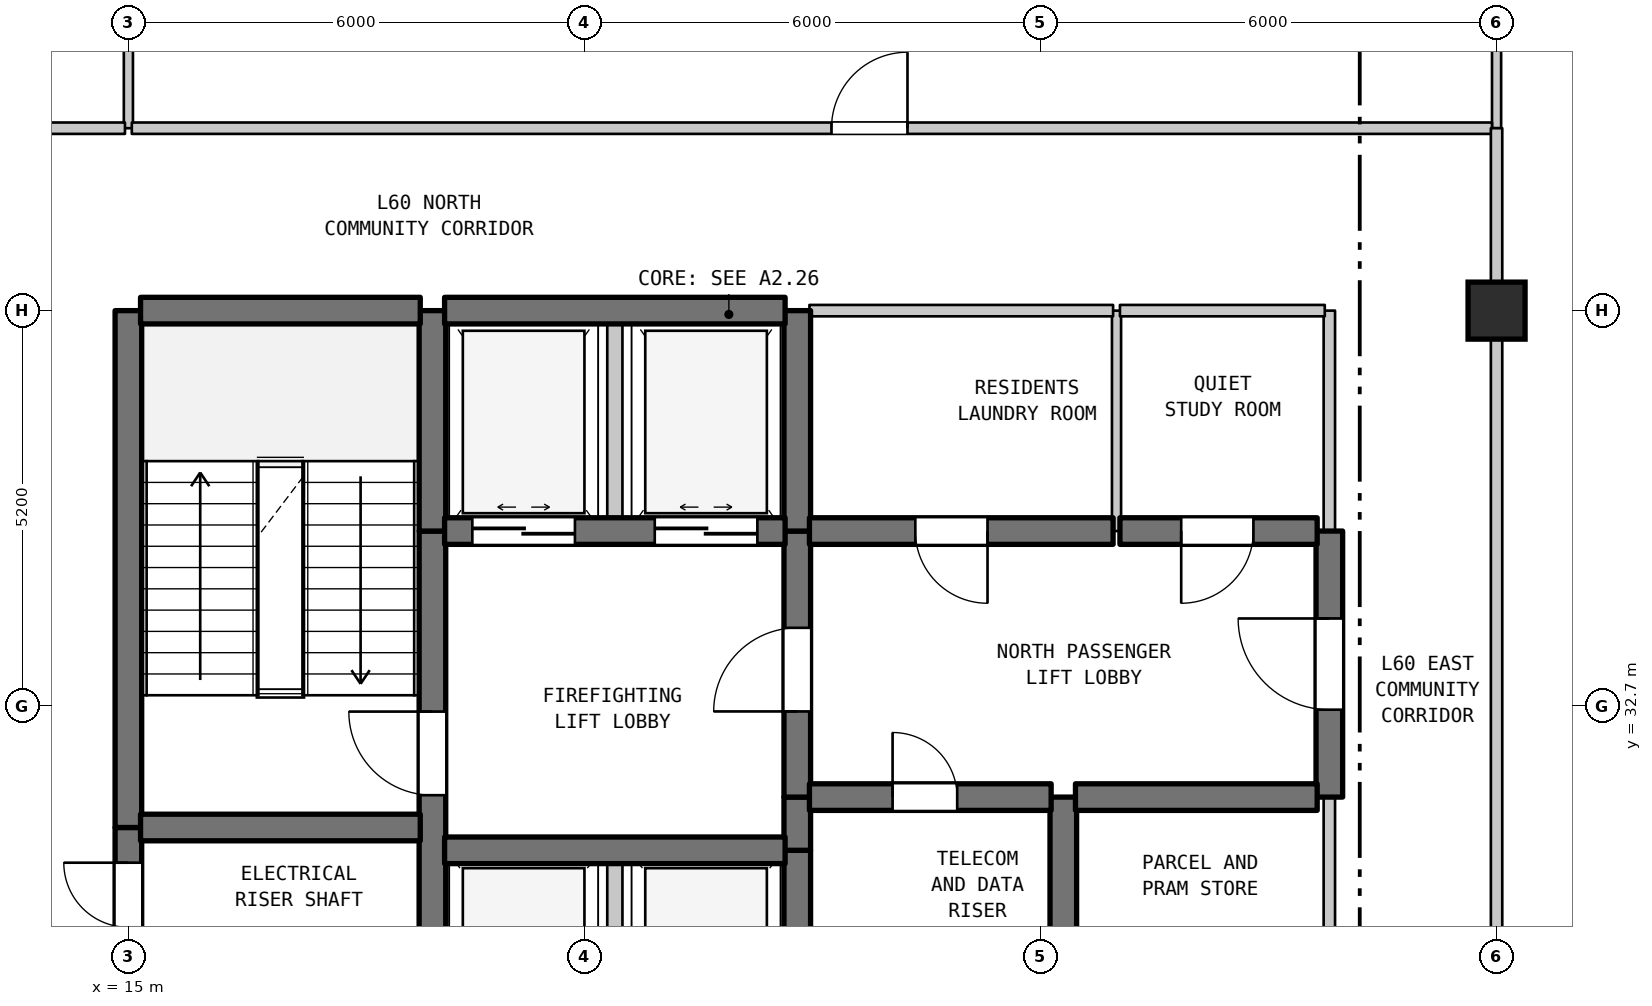
"""IFC4 building model, lengths in metres.
Left out: names, types, materials, properties, quantities, classifications, styles, units other than length and angle.
Written with IfcOpenShell. Run it as: python <this file> out.ifc"""

import sys

from ifc_helpers import new_model, si_unit, direction, frame, frame_2d, origin, origin_2d, place, context, subcontext, project, spatial, rectangle, extrude, element, fill, save


model = new_model("IFC4")
c1 = context("Model", 3, precision=1e-05, world=origin(), true_north=direction((0.0, 1.0)))
c2 = subcontext(c1, "Body", "Model", "MODEL_VIEW")
j1 = project(units=[si_unit("LENGTHUNIT", "METRE"), si_unit("PLANEANGLEUNIT", "RADIAN")], contexts=[c1])
p1 = place(None, origin())
s1 = spatial("IfcSite", under=j1, at=p1, CompositionType="ELEMENT")
p2 = place(p1, origin())
s2 = spatial("IfcBuilding", under=s1, at=p2, CompositionType="ELEMENT")
p3 = place(p2, frame((0.0, 0.0, 242.8)))
s3 = spatial("IfcBuildingStorey", under=s2, at=p3, CompositionType="ELEMENT", Elevation=242.8)
p4 = place(p3, frame((33.0, 37.9, 0.0), z_axis=(0.0, 0.0, 1.0), x_axis=(1.0, 0.0, 0.0)))
e1 = element("IfcColumn", 1, at=p4, inside=s3, PredefinedType="COLUMN", context=c2, shape_type="SweptSolid", body=[
    extrude(rectangle(XDim=0.75, YDim=0.75, at=origin_2d()), origin(), (0.0, 0.0, 1.0), 4.5),
])
p5 = place(p3, frame((15.0, 29.5, 0.0), z_axis=(0.0, 0.0, 1.0), x_axis=(0.0, 1.0, 0.0)))
e2 = element("IfcWall", 2, at=p5, inside=s3, PredefinedType="SHEAR", context=c2, shape_type="SweptSolid", body=[
    extrude(rectangle(XDim=1.6, YDim=0.35, at=frame_2d((0.8, 0.0))), origin(), (0.0, 0.0, 1.0), 4.19),
])
p6 = place(p5, frame((0.287, 0.0, 0.0)))
e3 = element("IfcOpeningElement", 3, at=p6, cuts=e2, PredefinedType="OPENING", context=c2, shape_type="SweptSolid", body=[
    extrude(rectangle(XDim=0.85, YDim=2.1, at=frame_2d((0.425, 1.05))), frame((0.0, 0.185, 0.0), z_axis=(0.0, -1.0, 0.0), x_axis=(1.0, 0.0, 0.0)), (0.0, 0.0, 1.0), 0.37),
])
p7 = place(p3, frame((15.0, 31.1, 0.0), z_axis=(0.0, 0.0, 1.0), x_axis=(0.0, 1.0, 0.0)))
e4 = element("IfcWall", 4, at=p7, inside=s3, PredefinedType="SHEAR", context=c2, shape_type="SweptSolid", body=[
    extrude(rectangle(XDim=6.8, YDim=0.35, at=frame_2d((3.4, 0.0))), origin(), (0.0, 0.0, 1.0), 4.19),
])
p8 = place(p3, frame((15.0, 40.3, 0.0), z_axis=(0.0, 0.0, 1.0), x_axis=(0.0, 1.0, 0.0)))
e5 = element("IfcWall", 5, at=p8, inside=s3, PredefinedType="PARTITIONING", context=c2, shape_type="SweptSolid", body=[
    extrude(rectangle(XDim=12.933, YDim=0.12, at=frame_2d((6.466, 0.0))), origin(), (0.0, 0.0, 1.0), 4.19),
])
p9 = place(p3, frame((19.0, 29.5, 0.0), z_axis=(0.0, 0.0, 1.0), x_axis=(0.0, 1.0, 0.0)))
e6 = element("IfcWall", 6, at=p9, inside=s3, PredefinedType="SHEAR", context=c2, shape_type="SweptSolid", body=[
    extrude(rectangle(XDim=5.5, YDim=0.35, at=frame_2d((2.75, 0.0))), origin(), (0.0, 0.0, 1.0), 4.19),
])
p10 = place(p9, frame((2.025, 0.0, 0.0)))
e7 = element("IfcOpeningElement", 7, at=p10, cuts=e6, PredefinedType="OPENING", context=c2, shape_type="SweptSolid", body=[
    extrude(rectangle(XDim=1.1, YDim=2.15, at=frame_2d((0.55, 1.075))), frame((0.0, 0.185, 0.0), z_axis=(0.0, -1.0, 0.0), x_axis=(1.0, 0.0, 0.0)), (0.0, 0.0, 1.0), 0.37),
])
p11 = place(p3, frame((19.0, 35.0, 0.0), z_axis=(0.0, 0.0, 1.0), x_axis=(0.0, 1.0, 0.0)))
e8 = element("IfcWall", 8, at=p11, inside=s3, PredefinedType="SHEAR", context=c2, shape_type="SweptSolid", body=[
    extrude(rectangle(XDim=2.9, YDim=0.35, at=frame_2d((1.45, 0.0))), origin(), (0.0, 0.0, 1.0), 4.19),
])
p12 = place(p3, frame((21.4, 28.2, 0.0), z_axis=(0.0, 0.0, 1.0), x_axis=(0.0, 1.0, 0.0)))
e9 = element("IfcWall", 9, at=p12, inside=s3, PredefinedType="STANDARD", context=c2, shape_type="SweptSolid", body=[
    extrude(rectangle(XDim=2.6, YDim=0.2, at=frame_2d((1.3, 0.0))), origin(), (0.0, 0.0, 1.0), 4.19),
])
p13 = place(p3, frame((21.4, 35.0, 0.0), z_axis=(0.0, 0.0, 1.0), x_axis=(0.0, 1.0, 0.0)))
e10 = element("IfcWall", 10, at=p13, inside=s3, PredefinedType="STANDARD", context=c2, shape_type="SweptSolid", body=[
    extrude(rectangle(XDim=2.9, YDim=0.2, at=frame_2d((1.45, 0.0))), origin(), (0.0, 0.0, 1.0), 4.19),
])
p14 = place(p3, frame((23.8, 28.2, 0.0), z_axis=(0.0, 0.0, 1.0), x_axis=(0.0, 1.0, 0.0)))
e11 = element("IfcWall", 11, at=p14, inside=s3, PredefinedType="SHEAR", context=c2, shape_type="SweptSolid", body=[
    extrude(rectangle(XDim=2.6, YDim=0.35, at=frame_2d((1.3, 0.0))), origin(), (0.0, 0.0, 1.0), 4.19),
])
p15 = place(p3, frame((23.8, 30.8, 0.0), z_axis=(0.0, 0.0, 1.0), x_axis=(0.0, 1.0, 0.0)))
e12 = element("IfcWall", 12, at=p15, inside=s3, PredefinedType="SHEAR", context=c2, shape_type="SweptSolid", body=[
    extrude(rectangle(XDim=0.7, YDim=0.35, at=frame_2d((0.35, 0.0))), origin(), (0.0, 0.0, 1.0), 4.19),
])
p16 = place(p3, frame((23.8, 31.5, 0.0), z_axis=(0.0, 0.0, 1.0), x_axis=(0.0, 1.0, 0.0)))
e13 = element("IfcWall", 13, at=p16, inside=s3, PredefinedType="SHEAR", context=c2, shape_type="SweptSolid", body=[
    extrude(rectangle(XDim=3.5, YDim=0.35, at=frame_2d((1.75, 0.0))), origin(), (0.0, 0.0, 1.0), 4.19),
])
p17 = place(p16, frame((1.127, 0.0, 0.0)))
e14 = element("IfcOpeningElement", 14, at=p17, cuts=e13, PredefinedType="OPENING", context=c2, shape_type="SweptSolid", body=[
    extrude(rectangle(XDim=1.1, YDim=2.15, at=frame_2d((0.55, 1.075))), frame((0.0, 0.185, 0.0), z_axis=(0.0, -1.0, 0.0), x_axis=(1.0, 0.0, 0.0)), (0.0, 0.0, 1.0), 0.37),
])
p18 = place(p3, frame((23.8, 35.0, 0.0), z_axis=(0.0, 0.0, 1.0), x_axis=(0.0, 1.0, 0.0)))
e15 = element("IfcWall", 15, at=p18, inside=s3, PredefinedType="SHEAR", context=c2, shape_type="SweptSolid", body=[
    extrude(rectangle(XDim=2.9, YDim=0.35, at=frame_2d((1.45, 0.0))), origin(), (0.0, 0.0, 1.0), 4.19),
])
p19 = place(p3, frame((27.3, 28.9, 0.0), z_axis=(0.0, 0.0, 1.0), x_axis=(0.0, 1.0, 0.0)))
e16 = element("IfcWall", 16, at=p19, inside=s3, PredefinedType="SHEAR", context=c2, shape_type="SweptSolid", body=[
    extrude(rectangle(XDim=2.6, YDim=0.35, at=frame_2d((1.3, 0.0))), origin(), (0.0, 0.0, 1.0), 4.19),
])
p20 = place(p3, frame((28.0, 35.0, 0.0), z_axis=(0.0, 0.0, 1.0), x_axis=(0.0, 1.0, 0.0)))
e17 = element("IfcWall", 17, at=p20, inside=s3, PredefinedType="PARTITIONING", context=c2, shape_type="SweptSolid", body=[
    extrude(rectangle(XDim=2.9, YDim=0.12, at=frame_2d((1.45, 0.0))), origin(), (0.0, 0.0, 1.0), 4.19),
])
p21 = place(p3, frame((30.8, 28.9, 0.0), z_axis=(0.0, 0.0, 1.0), x_axis=(0.0, 1.0, 0.0)))
e18 = element("IfcWall", 18, at=p21, inside=s3, PredefinedType="STANDARD", context=c2, shape_type="SweptSolid", body=[
    extrude(rectangle(XDim=2.6, YDim=0.15, at=frame_2d((1.3, 0.0))), origin(), (0.0, 0.0, 1.0), 4.19),
])
p22 = place(p3, frame((30.8, 31.5, 0.0), z_axis=(0.0, 0.0, 1.0), x_axis=(0.0, 1.0, 0.0)))
e19 = element("IfcWall", 19, at=p22, inside=s3, PredefinedType="SHEAR", context=c2, shape_type="SweptSolid", body=[
    extrude(rectangle(XDim=3.5, YDim=0.35, at=frame_2d((1.75, 0.0))), origin(), (0.0, 0.0, 1.0), 4.19),
])
p23 = place(p22, frame((1.15, 0.0, 0.0)))
e20 = element("IfcOpeningElement", 20, at=p23, cuts=e19, PredefinedType="OPENING", context=c2, shape_type="SweptSolid", body=[
    extrude(rectangle(XDim=1.2, YDim=2.2, at=frame_2d((0.6, 1.1))), frame((0.0, 0.185, 0.0), z_axis=(0.0, -1.0, 0.0), x_axis=(1.0, 0.0, 0.0)), (0.0, 0.0, 1.0), 0.37),
])
p24 = place(p3, frame((30.8, 35.0, 0.0), z_axis=(0.0, 0.0, 1.0), x_axis=(0.0, 1.0, 0.0)))
e21 = element("IfcWall", 21, at=p24, inside=s3, PredefinedType="STANDARD", context=c2, shape_type="SweptSolid", body=[
    extrude(rectangle(XDim=2.9, YDim=0.15, at=frame_2d((1.45, 0.0))), origin(), (0.0, 0.0, 1.0), 4.19),
])
p25 = place(p3, frame((33.0, 27.9, 0.0), z_axis=(0.0, 0.0, 1.0), x_axis=(0.0, 1.0, 0.0)))
e22 = element("IfcWall", 22, at=p25, inside=s3, PredefinedType="STANDARD", context=c2, shape_type="SweptSolid", body=[
    extrude(rectangle(XDim=10.0, YDim=0.15, at=frame_2d((5.0, 0.0))), origin(), (0.0, 0.0, 1.0), 3.69),
])
p26 = place(p3, frame((33.0, 40.3, 0.0), z_axis=(0.0, 0.0, 1.0), x_axis=(0.0, 1.0, 0.0)))
e23 = element("IfcWall", 23, at=p26, inside=s3, PredefinedType="PARTITIONING", context=c2, shape_type="SweptSolid", body=[
    extrude(rectangle(XDim=13.59, YDim=0.12, at=frame_2d((6.795, 0.0))), origin(), (0.0, 0.0, 1.0), 3.59),
])
p27 = place(p3, frame((19.16, 30.8, 0.0), z_axis=(0.0, 0.0, 1.0), x_axis=(1.0, 0.0, 0.0)))
e24 = element("IfcWall", 24, at=p27, inside=s3, PredefinedType="SHEAR", context=c2, shape_type="SweptSolid", body=[
    extrude(rectangle(XDim=4.48, YDim=0.35, at=frame_2d((2.24, 0.0))), origin(), (0.0, 0.0, 1.0), 4.19),
])
p28 = place(p3, frame((15.16, 31.1, 0.0), z_axis=(0.0, 0.0, 1.0), x_axis=(1.0, 0.0, 0.0)))
e25 = element("IfcWall", 25, at=p28, inside=s3, PredefinedType="SHEAR", context=c2, shape_type="SweptSolid", body=[
    extrude(rectangle(XDim=3.68, YDim=0.35, at=frame_2d((1.84, 0.0))), origin(), (0.0, 0.0, 1.0), 4.19),
])
p29 = place(p3, frame((23.96, 31.5, 0.0), z_axis=(0.0, 0.0, 1.0), x_axis=(1.0, 0.0, 0.0)))
e26 = element("IfcWall", 26, at=p29, inside=s3, PredefinedType="SHEAR", context=c2, shape_type="SweptSolid", body=[
    extrude(rectangle(XDim=3.18, YDim=0.35, at=frame_2d((1.59, 0.0))), origin(), (0.0, 0.0, 1.0), 4.19),
])
p30 = place(p29, frame((1.094, 0.0, 0.0)))
e27 = element("IfcOpeningElement", 27, at=p30, cuts=e26, PredefinedType="OPENING", context=c2, shape_type="SweptSolid", body=[
    extrude(rectangle(XDim=0.85, YDim=2.1, at=frame_2d((0.425, 1.05))), frame((0.0, 0.185, 0.0), z_axis=(0.0, -1.0, 0.0), x_axis=(1.0, 0.0, 0.0)), (0.0, 0.0, 1.0), 0.37),
])
p31 = place(p3, frame((27.46, 31.5, 0.0), z_axis=(0.0, 0.0, 1.0), x_axis=(1.0, 0.0, 0.0)))
e28 = element("IfcWall", 28, at=p31, inside=s3, PredefinedType="SHEAR", context=c2, shape_type="SweptSolid", body=[
    extrude(rectangle(XDim=3.18, YDim=0.35, at=frame_2d((1.59, 0.0))), origin(), (0.0, 0.0, 1.0), 4.19),
])
p32 = place(p3, frame((19.16, 35.0, 0.0), z_axis=(0.0, 0.0, 1.0), x_axis=(1.0, 0.0, 0.0)))
e29 = element("IfcWall", 29, at=p32, inside=s3, PredefinedType="SHEAR", context=c2, shape_type="SweptSolid", body=[
    extrude(rectangle(XDim=4.48, YDim=0.35, at=frame_2d((2.24, 0.0))), origin(), (0.0, 0.0, 1.0), 4.19),
])
p33 = place(p32, frame((0.365, 0.0, 0.0)))
e30 = element("IfcOpeningElement", 30, at=p33, cuts=e29, PredefinedType="OPENING", context=c2, shape_type="SweptSolid", body=[
    extrude(rectangle(XDim=1.35, YDim=2.2, at=frame_2d((0.675, 1.1))), frame((0.0, 0.185, 0.0), z_axis=(0.0, -1.0, 0.0), x_axis=(1.0, 0.0, 0.0)), (0.0, 0.0, 1.0), 0.37),
])
p34 = place(p32, frame((2.765, 0.0, 0.0)))
e31 = element("IfcOpeningElement", 31, at=p34, cuts=e29, PredefinedType="OPENING", context=c2, shape_type="SweptSolid", body=[
    extrude(rectangle(XDim=1.35, YDim=2.2, at=frame_2d((0.675, 1.1))), frame((0.0, 0.185, 0.0), z_axis=(0.0, -1.0, 0.0), x_axis=(1.0, 0.0, 0.0)), (0.0, 0.0, 1.0), 0.37),
])
p35 = place(p3, frame((23.96, 35.0, 0.0), z_axis=(0.0, 0.0, 1.0), x_axis=(1.0, 0.0, 0.0)))
e32 = element("IfcWall", 32, at=p35, inside=s3, PredefinedType="SHEAR", context=c2, shape_type="SweptSolid", body=[
    extrude(rectangle(XDim=3.995, YDim=0.35, at=frame_2d((1.998, 0.0))), origin(), (0.0, 0.0, 1.0), 4.19),
])
p36 = place(p35, frame((1.393, 0.0, 0.0)))
e33 = element("IfcOpeningElement", 33, at=p36, cuts=e32, PredefinedType="OPENING", context=c2, shape_type="SweptSolid", body=[
    extrude(rectangle(XDim=0.95, YDim=2.15, at=frame_2d((0.475, 1.075))), frame((0.0, 0.185, 0.0), z_axis=(0.0, -1.0, 0.0), x_axis=(1.0, 0.0, 0.0)), (0.0, 0.0, 1.0), 0.37),
])
p37 = place(p3, frame((28.045, 35.0, 0.0), z_axis=(0.0, 0.0, 1.0), x_axis=(1.0, 0.0, 0.0)))
e34 = element("IfcWall", 34, at=p37, inside=s3, PredefinedType="SHEAR", context=c2, shape_type="SweptSolid", body=[
    extrude(rectangle(XDim=2.595, YDim=0.35, at=frame_2d((1.297, 0.0))), origin(), (0.0, 0.0, 1.0), 4.19),
])
p38 = place(p37, frame((0.806, 0.0, 0.0)))
e35 = element("IfcOpeningElement", 35, at=p38, cuts=e34, PredefinedType="OPENING", context=c2, shape_type="SweptSolid", body=[
    extrude(rectangle(XDim=0.95, YDim=2.15, at=frame_2d((0.475, 1.075))), frame((0.0, 0.185, 0.0), z_axis=(0.0, -1.0, 0.0), x_axis=(1.0, 0.0, 0.0)), (0.0, 0.0, 1.0), 0.37),
])
p39 = place(p3, frame((15.16, 37.9, 0.0), z_axis=(0.0, 0.0, 1.0), x_axis=(1.0, 0.0, 0.0)))
e36 = element("IfcWall", 36, at=p39, inside=s3, PredefinedType="SHEAR", context=c2, shape_type="SweptSolid", body=[
    extrude(rectangle(XDim=3.68, YDim=0.35, at=frame_2d((1.84, 0.0))), origin(), (0.0, 0.0, 1.0), 4.19),
])
p40 = place(p3, frame((19.16, 37.9, 0.0), z_axis=(0.0, 0.0, 1.0), x_axis=(1.0, 0.0, 0.0)))
e37 = element("IfcWall", 37, at=p40, inside=s3, PredefinedType="SHEAR", context=c2, shape_type="SweptSolid", body=[
    extrude(rectangle(XDim=4.48, YDim=0.35, at=frame_2d((2.24, 0.0))), origin(), (0.0, 0.0, 1.0), 4.19),
])
p41 = place(p3, frame((23.96, 37.9, 0.0), z_axis=(0.0, 0.0, 1.0), x_axis=(1.0, 0.0, 0.0)))
e38 = element("IfcWall", 38, at=p41, inside=s3, PredefinedType="STANDARD", context=c2, shape_type="SweptSolid", body=[
    extrude(rectangle(XDim=3.995, YDim=0.15, at=frame_2d((1.998, 0.0))), origin(), (0.0, 0.0, 1.0), 3.69),
])
p42 = place(p3, frame((28.045, 37.9, 0.0), z_axis=(0.0, 0.0, 1.0), x_axis=(1.0, 0.0, 0.0)))
e39 = element("IfcWall", 39, at=p42, inside=s3, PredefinedType="STANDARD", context=c2, shape_type="SweptSolid", body=[
    extrude(rectangle(XDim=2.695, YDim=0.15, at=frame_2d((1.348, 0.0))), origin(), (0.0, 0.0, 1.0), 3.69),
])
p43 = place(p3, frame((12.66, 40.3, 0.0), z_axis=(0.0, 0.0, 1.0), x_axis=(1.0, 0.0, 0.0)))
e40 = element("IfcWall", 40, at=p43, inside=s3, PredefinedType="STANDARD", context=c2, shape_type="SweptSolid", body=[
    extrude(rectangle(XDim=2.295, YDim=0.15, at=frame_2d((1.147, 0.0))), origin(), (0.0, 0.0, 1.0), 4.19),
])
p44 = place(p3, frame((15.045, 40.3, 0.0), z_axis=(0.0, 0.0, 1.0), x_axis=(1.0, 0.0, 0.0)))
e41 = element("IfcWall", 41, at=p44, inside=s3, PredefinedType="STANDARD", context=c2, shape_type="SweptSolid", body=[
    extrude(rectangle(XDim=17.895, YDim=0.15, at=frame_2d((8.948, 0.0))), origin(), (0.0, 0.0, 1.0), 4.19),
])
p45 = place(p44, frame((9.205, 0.0, 0.0)))
e42 = element("IfcOpeningElement", 42, at=p45, cuts=e41, PredefinedType="OPENING", context=c2, shape_type="SweptSolid", body=[
    extrude(rectangle(XDim=1.0, YDim=2.15, at=frame_2d((0.5, 1.075))), frame((0.0, 0.085, 0.0), z_axis=(0.0, -1.0, 0.0), x_axis=(1.0, 0.0, 0.0)), (0.0, 0.0, 1.0), 0.17),
])
p46 = place(p3, frame((33.0, 37.9, 0.0), z_axis=(0.0, 0.0, 1.0), x_axis=(0.0, 1.0, 0.0)))
e43 = element("IfcWall", 43, at=p46, inside=s3, PredefinedType="STANDARD", context=c2, shape_type="SweptSolid", body=[
    extrude(rectangle(XDim=2.4, YDim=0.15, at=frame_2d((1.2, 0.0))), origin(), (0.0, 0.0, 1.0), 3.59),
])
p47 = place(p6, origin())
e44 = element("IfcDoor", 44, at=p47, inside=s3, OperationType="SINGLE_SWING_RIGHT", PredefinedType="DOOR", context=c2, shape_type="SweptSolid", body=[
    extrude(rectangle(XDim=0.85, YDim=2.1, at=frame_2d((0.425, 1.05))), frame((0.0, 0.025, 0.0), z_axis=(0.0, -1.0, 0.0), x_axis=(1.0, 0.0, 0.0)), (0.0, 0.0, 1.0), 0.05),
])
fill(e3, e44)
p48 = place(p10, origin())
e45 = element("IfcDoor", 45, at=p48, inside=s3, OperationType="SINGLE_SWING_RIGHT", PredefinedType="DOOR", context=c2, shape_type="SweptSolid", body=[
    extrude(rectangle(XDim=1.1, YDim=2.15, at=frame_2d((0.55, 1.075))), frame((0.0, 0.025, 0.0), z_axis=(0.0, -1.0, 0.0), x_axis=(1.0, 0.0, 0.0)), (0.0, 0.0, 1.0), 0.05),
])
fill(e7, e45)
p49 = place(p17, origin())
e46 = element("IfcDoor", 46, at=p49, inside=s3, OperationType="SINGLE_SWING_LEFT", PredefinedType="DOOR", context=c2, shape_type="SweptSolid", body=[
    extrude(rectangle(XDim=1.1, YDim=2.15, at=frame_2d((0.55, 1.075))), frame((0.0, 0.025, 0.0), z_axis=(0.0, -1.0, 0.0), x_axis=(1.0, 0.0, 0.0)), (0.0, 0.0, 1.0), 0.05),
])
fill(e14, e46)
p50 = place(p23, origin())
e47 = element("IfcDoor", 47, at=p50, inside=s3, OperationType="SINGLE_SWING_RIGHT", PredefinedType="DOOR", context=c2, shape_type="SweptSolid", body=[
    extrude(rectangle(XDim=1.2, YDim=2.2, at=frame_2d((0.6, 1.1))), frame((0.0, 0.025, 0.0), z_axis=(0.0, -1.0, 0.0), x_axis=(1.0, 0.0, 0.0)), (0.0, 0.0, 1.0), 0.05),
])
fill(e20, e47)
p51 = place(p30, origin())
e48 = element("IfcDoor", 48, at=p51, inside=s3, OperationType="SINGLE_SWING_LEFT", PredefinedType="DOOR", context=c2, shape_type="SweptSolid", body=[
    extrude(rectangle(XDim=0.85, YDim=2.1, at=frame_2d((0.425, 1.05))), frame((0.0, 0.025, 0.0), z_axis=(0.0, -1.0, 0.0), x_axis=(1.0, 0.0, 0.0)), (0.0, 0.0, 1.0), 0.05),
])
fill(e27, e48)
p52 = place(p33, origin())
e49 = element("IfcDoor", 49, at=p52, inside=s3, OperationType="DOUBLE_DOOR_SLIDING", PredefinedType="DOOR", context=c2, shape_type="SweptSolid", body=[
    extrude(rectangle(XDim=1.35, YDim=2.2, at=frame_2d((0.675, 1.1))), frame((0.0, 0.025, 0.0), z_axis=(0.0, -1.0, 0.0), x_axis=(1.0, 0.0, 0.0)), (0.0, 0.0, 1.0), 0.05),
])
fill(e30, e49)
p53 = place(p34, origin())
e50 = element("IfcDoor", 50, at=p53, inside=s3, OperationType="DOUBLE_DOOR_SLIDING", PredefinedType="DOOR", context=c2, shape_type="SweptSolid", body=[
    extrude(rectangle(XDim=1.35, YDim=2.2, at=frame_2d((0.675, 1.1))), frame((0.0, 0.025, 0.0), z_axis=(0.0, -1.0, 0.0), x_axis=(1.0, 0.0, 0.0)), (0.0, 0.0, 1.0), 0.05),
])
fill(e31, e50)
p54 = place(p36, frame((0.95, 0.0, 0.0), z_axis=(0.0, 0.0, 1.0), x_axis=(-1.0, 0.0, 0.0)))
e51 = element("IfcDoor", 51, at=p54, inside=s3, OperationType="SINGLE_SWING_RIGHT", PredefinedType="DOOR", context=c2, shape_type="SweptSolid", body=[
    extrude(rectangle(XDim=0.95, YDim=2.15, at=frame_2d((0.475, 1.075))), frame((0.0, 0.025, 0.0), z_axis=(0.0, -1.0, 0.0), x_axis=(1.0, 0.0, 0.0)), (0.0, 0.0, 1.0), 0.05),
])
fill(e33, e51)
p55 = place(p38, frame((0.95, 0.0, 0.0), z_axis=(0.0, 0.0, 1.0), x_axis=(-1.0, 0.0, 0.0)))
e52 = element("IfcDoor", 52, at=p55, inside=s3, OperationType="SINGLE_SWING_LEFT", PredefinedType="DOOR", context=c2, shape_type="SweptSolid", body=[
    extrude(rectangle(XDim=0.95, YDim=2.15, at=frame_2d((0.475, 1.075))), frame((0.0, 0.025, 0.0), z_axis=(0.0, -1.0, 0.0), x_axis=(1.0, 0.0, 0.0)), (0.0, 0.0, 1.0), 0.05),
])
fill(e35, e52)
p56 = place(p45, origin())
e53 = element("IfcDoor", 53, at=p56, inside=s3, OperationType="SINGLE_SWING_RIGHT", PredefinedType="DOOR", context=c2, shape_type="SweptSolid", body=[
    extrude(rectangle(XDim=1.0, YDim=2.15, at=frame_2d((0.5, 1.075))), frame((0.0, 0.025, 0.0), z_axis=(0.0, -1.0, 0.0), x_axis=(1.0, 0.0, 0.0)), (0.0, 0.0, 1.0), 0.05),
])
fill(e42, e53)
save(model, sys.argv[1])
